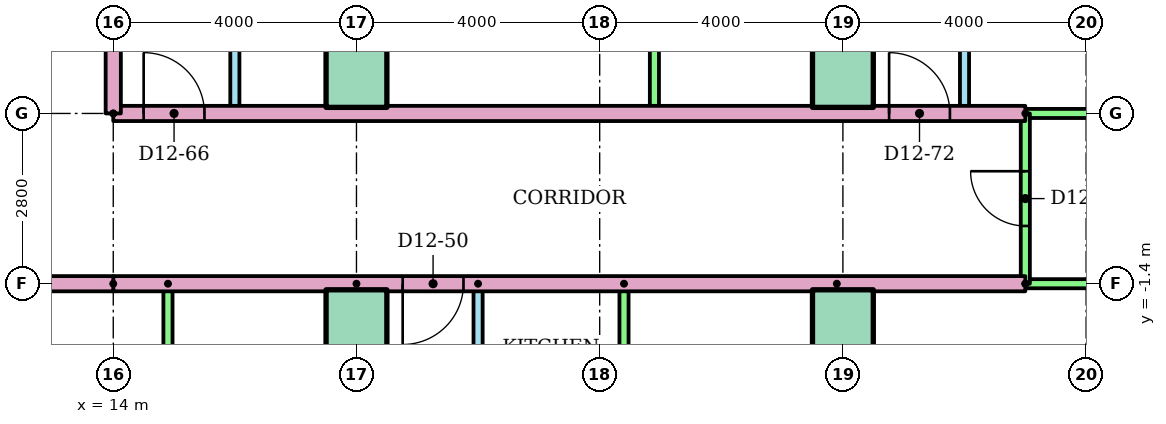
"""IFC4 building model, lengths in metres.
Left out: names, types, materials, properties, quantities, classifications, styles, units other than length and angle.
Written with IfcOpenShell. Run it as: python <this file> out.ifc"""

import sys

from ifc_helpers import new_model, si_unit, direction, frame, frame_2d, origin, origin_2d, place, context, subcontext, project, spatial, rectangle, extrude, element, fill, save


model = new_model("IFC4")
c1 = context("Model", 3, precision=1e-05, world=origin(), true_north=direction((0.0, 1.0)))
c2 = subcontext(c1, "Body", "Model", "MODEL_VIEW")
j1 = project(units=[si_unit("LENGTHUNIT", "METRE"), si_unit("PLANEANGLEUNIT", "RADIAN")], contexts=[c1])
p1 = place(None, origin())
s1 = spatial("IfcSite", under=j1, at=p1, CompositionType="ELEMENT")
p2 = place(p1, origin())
s2 = spatial("IfcBuilding", under=s1, at=p2, CompositionType="ELEMENT")
p3 = place(p2, frame((0.0, 0.0, 48.0)))
s3 = spatial("IfcBuildingStorey", under=s2, at=p3, CompositionType="ELEMENT", Elevation=48.0)
for number, where in (
    (1, (18.0, -2.0, 0.0)),
    (2, (26.0, -2.0, 0.0)),
    (3, (18.0, 2.0, 0.0)),
    (4, (26.0, 2.0, 0.0)),
):
    element("IfcColumn", number, at=place(p3, frame(where)), inside=s3, PredefinedType="COLUMN", context=c2, shape_type="SweptSolid", body=[
        extrude(rectangle(XDim=1.0, YDim=1.0, at=origin_2d()), origin(), (0.0, 0.0, 1.0), 3.2),
    ])
p4 = place(p3, frame((14.9, -1.4, 0.0), z_axis=(0.0, 0.0, 1.0), x_axis=(0.0, -1.0, 0.0)))
e5 = element("IfcWall", 5, at=p4, inside=s3, PredefinedType="PARTITIONING", context=c2, shape_type="SweptSolid", body=[
    extrude(rectangle(XDim=6.4, YDim=0.15, at=frame_2d((3.2, 0.0))), origin(), (0.0, 0.0, 1.0), 2.4),
])
p5 = place(p3, frame((20.0, -1.4, 0.0), z_axis=(0.0, 0.0, 1.0), x_axis=(0.0, -1.0, 0.0)))
e6 = element("IfcWall", 6, at=p5, inside=s3, PredefinedType="PARTITIONING", context=c2, shape_type="SweptSolid", body=[
    extrude(rectangle(XDim=6.4, YDim=0.15, at=frame_2d((3.2, 0.0))), origin(), (0.0, 0.0, 1.0), 2.4),
])
p6 = place(p5, frame((1.36, 0.0, 0.0)))
e7 = element("IfcOpeningElement", 7, at=p6, cuts=e6, PredefinedType="OPENING", context=c2, shape_type="SweptSolid", body=[
    extrude(rectangle(XDim=0.9, YDim=2.1, at=frame_2d((0.45, 1.05))), frame((0.0, 0.085, 0.0), z_axis=(0.0, -1.0, 0.0), x_axis=(1.0, 0.0, 0.0)), (0.0, 0.0, 1.0), 0.17),
])
p7 = place(p5, frame((4.55, 0.0, 0.0)))
e8 = element("IfcOpeningElement", 8, at=p7, cuts=e6, PredefinedType="OPENING", context=c2, shape_type="SweptSolid", body=[
    extrude(rectangle(XDim=0.8, YDim=2.1, at=frame_2d((0.4, 1.05))), frame((0.0, 0.085, 0.0), z_axis=(0.0, -1.0, 0.0), x_axis=(1.0, 0.0, 0.0)), (0.0, 0.0, 1.0), 0.17),
])
for number, where, z_axis, x_axis in (
    (9, (22.4, -1.4, 0.0), (0.0, 0.0, 1.0), (0.0, -1.0, 0.0)),
    (10, (25.9, -1.4, 0.0), (0.0, 0.0, 1.0), (0.0, -1.0, 0.0)),
):
    element("IfcWall", number, at=place(p3, frame(where, z_axis=z_axis, x_axis=x_axis)), inside=s3, PredefinedType="PARTITIONING", context=c2, shape_type="SweptSolid", body=[
        extrude(rectangle(XDim=6.4, YDim=0.15, at=frame_2d((3.2, 0.0))), origin(), (0.0, 0.0, 1.0), 2.4),
    ])
p8 = place(p3, frame((18.0, -1.4, 0.0), z_axis=(0.0, 0.0, 1.0), x_axis=(0.0, -1.0, 0.0)))
e11 = element("IfcWall", 11, at=p8, inside=s3, PredefinedType="PARTITIONING", context=c2, shape_type="SweptSolid", body=[
    extrude(rectangle(XDim=14.71, YDim=0.25, at=frame_2d((7.355, 0.0))), origin(), (0.0, 0.0, 1.0), 2.4),
])
p9 = place(p3, frame((29.0, -1.4, 0.0), z_axis=(0.0, 0.0, 1.0), x_axis=(-1.0, 0.0, 0.0)))
e12 = element("IfcWall", 12, at=p9, inside=s3, PredefinedType="PARTITIONING", context=c2, shape_type="SweptSolid", body=[
    extrude(rectangle(XDim=15.0, YDim=0.25, at=frame_2d((7.5, 0.0))), origin(), (0.0, 0.0, 1.0), 2.4),
])
p10 = place(p9, frame((9.24, 0.0, 0.0)))
e13 = element("IfcOpeningElement", 13, at=p10, cuts=e12, PredefinedType="OPENING", context=c2, shape_type="SweptSolid", body=[
    extrude(rectangle(XDim=1.0, YDim=2.1, at=frame_2d((0.5, 1.05))), frame((0.0, 0.135, 0.0), z_axis=(0.0, -1.0, 0.0), x_axis=(1.0, 0.0, 0.0)), (0.0, 0.0, 1.0), 0.27),
])
p11 = place(p3, frame((36.52, -1.4, 0.0), z_axis=(0.0, 0.0, 1.0), x_axis=(-1.0, 0.0, 0.0)))
e14 = element("IfcWall", 14, at=p11, inside=s3, PredefinedType="PARTITIONING", context=c2, shape_type="SweptSolid", body=[
    extrude(rectangle(XDim=7.52, YDim=0.15, at=frame_2d((3.76, 0.0))), origin(), (0.0, 0.0, 1.0), 2.4),
])
p12 = place(p3, frame((16.0, 10.2, 0.0), z_axis=(0.0, 0.0, 1.0), x_axis=(0.0, -1.0, 0.0)))
e15 = element("IfcWall", 15, at=p12, inside=s3, PredefinedType="PARTITIONING", context=c2, shape_type="SweptSolid", body=[
    extrude(rectangle(XDim=8.8, YDim=0.15, at=frame_2d((4.4, 0.0))), origin(), (0.0, 0.0, 1.0), 2.4),
])
p13 = place(p12, frame((5.975, 0.0, 0.0)))
e16 = element("IfcOpeningElement", 16, at=p13, cuts=e15, PredefinedType="OPENING", context=c2, shape_type="SweptSolid", body=[
    extrude(rectangle(XDim=0.9, YDim=2.1, at=frame_2d((0.45, 1.05))), frame((0.0, 0.085, 0.0), z_axis=(0.0, -1.0, 0.0), x_axis=(1.0, 0.0, 0.0)), (0.0, 0.0, 1.0), 0.17),
])
p14 = place(p12, frame((1.625, 0.0, 0.0)))
e17 = element("IfcOpeningElement", 17, at=p14, cuts=e15, PredefinedType="OPENING", context=c2, shape_type="SweptSolid", body=[
    extrude(rectangle(XDim=0.8, YDim=2.1, at=frame_2d((0.4, 1.05))), frame((0.0, 0.085, 0.0), z_axis=(0.0, -1.0, 0.0), x_axis=(1.0, 0.0, 0.0)), (0.0, 0.0, 1.0), 0.17),
])
for number, where, z_axis, x_axis in (
    (18, (18.4, 10.2, 0.0), (0.0, 0.0, 1.0), (0.0, -1.0, 0.0)),
    (19, (22.9, 10.2, 0.0), (0.0, 0.0, 1.0), (0.0, -1.0, 0.0)),
):
    element("IfcWall", number, at=place(p3, frame(where, z_axis=z_axis, x_axis=x_axis)), inside=s3, PredefinedType="PARTITIONING", context=c2, shape_type="SweptSolid", body=[
        extrude(rectangle(XDim=8.8, YDim=0.15, at=frame_2d((4.4, 0.0))), origin(), (0.0, 0.0, 1.0), 2.4),
    ])
p15 = place(p3, frame((28.0, 10.2, 0.0), z_axis=(0.0, 0.0, 1.0), x_axis=(0.0, -1.0, 0.0)))
e20 = element("IfcWall", 20, at=p15, inside=s3, PredefinedType="PARTITIONING", context=c2, shape_type="SweptSolid", body=[
    extrude(rectangle(XDim=8.8, YDim=0.15, at=frame_2d((4.4, 0.0))), origin(), (0.0, 0.0, 1.0), 2.4),
])
p16 = place(p15, frame((5.975, 0.0, 0.0)))
e21 = element("IfcOpeningElement", 21, at=p16, cuts=e20, PredefinedType="OPENING", context=c2, shape_type="SweptSolid", body=[
    extrude(rectangle(XDim=0.9, YDim=2.1, at=frame_2d((0.45, 1.05))), frame((0.0, 0.085, 0.0), z_axis=(0.0, -1.0, 0.0), x_axis=(1.0, 0.0, 0.0)), (0.0, 0.0, 1.0), 0.17),
])
p17 = place(p15, frame((1.625, 0.0, 0.0)))
e22 = element("IfcOpeningElement", 22, at=p17, cuts=e20, PredefinedType="OPENING", context=c2, shape_type="SweptSolid", body=[
    extrude(rectangle(XDim=0.8, YDim=2.1, at=frame_2d((0.4, 1.05))), frame((0.0, 0.085, 0.0), z_axis=(0.0, -1.0, 0.0), x_axis=(1.0, 0.0, 0.0)), (0.0, 0.0, 1.0), 0.17),
])
p18 = place(p3, frame((26.0, 18.521, 0.0), z_axis=(0.0, 0.0, 1.0), x_axis=(0.0, -1.0, 0.0)))
e23 = element("IfcWall", 23, at=p18, inside=s3, PredefinedType="PARTITIONING", context=c2, shape_type="SweptSolid", body=[
    extrude(rectangle(XDim=17.121, YDim=0.25, at=frame_2d((8.561, 0.0))), origin(), (0.0, 0.0, 1.0), 2.4),
])
p19 = place(p3, frame((14.0, 1.4, 0.0)))
e24 = element("IfcWall", 24, at=p19, inside=s3, PredefinedType="PARTITIONING", context=c2, shape_type="SweptSolid", body=[
    extrude(rectangle(XDim=15.0, YDim=0.25, at=frame_2d((7.5, 0.0))), origin(), (0.0, 0.0, 1.0), 2.4),
])
p20 = place(p19, frame((0.5, 0.0, 0.0)))
e25 = element("IfcOpeningElement", 25, at=p20, cuts=e24, PredefinedType="OPENING", context=c2, shape_type="SweptSolid", body=[
    extrude(rectangle(XDim=1.0, YDim=2.1, at=frame_2d((0.5, 1.05))), frame((0.0, 0.135, 0.0), z_axis=(0.0, -1.0, 0.0), x_axis=(1.0, 0.0, 0.0)), (0.0, 0.0, 1.0), 0.27),
])
p21 = place(p19, frame((12.76, 0.0, 0.0)))
e26 = element("IfcOpeningElement", 26, at=p21, cuts=e24, PredefinedType="OPENING", context=c2, shape_type="SweptSolid", body=[
    extrude(rectangle(XDim=1.0, YDim=2.1, at=frame_2d((0.5, 1.05))), frame((0.0, 0.135, 0.0), z_axis=(0.0, -1.0, 0.0), x_axis=(1.0, 0.0, 0.0)), (0.0, 0.0, 1.0), 0.27),
])
p22 = place(p3, frame((29.0, 1.4, 0.0)))
e27 = element("IfcWall", 27, at=p22, inside=s3, PredefinedType="PARTITIONING", context=c2, shape_type="SweptSolid", body=[
    extrude(rectangle(XDim=7.52, YDim=0.15, at=frame_2d((3.76, 0.0))), origin(), (0.0, 0.0, 1.0), 2.4),
])
p23 = place(p3, frame((29.0, -1.4, 0.0), z_axis=(0.0, 0.0, 1.0), x_axis=(0.0, 1.0, 0.0)))
e28 = element("IfcWall", 28, at=p23, inside=s3, PredefinedType="PARTITIONING", context=c2, shape_type="SweptSolid", body=[
    extrude(rectangle(XDim=2.8, YDim=0.15, at=frame_2d((1.4, 0.0))), origin(), (0.0, 0.0, 1.0), 2.4),
])
p24 = place(p23, frame((0.95, 0.0, 0.0)))
e29 = element("IfcOpeningElement", 29, at=p24, cuts=e28, PredefinedType="OPENING", context=c2, shape_type="SweptSolid", body=[
    extrude(rectangle(XDim=0.9, YDim=2.1, at=frame_2d((0.45, 1.05))), frame((0.0, 0.085, 0.0), z_axis=(0.0, -1.0, 0.0), x_axis=(1.0, 0.0, 0.0)), (0.0, 0.0, 1.0), 0.17),
])
p25 = place(p3, frame((14.0, -1.4, 0.0), z_axis=(0.0, 0.0, 1.0), x_axis=(-1.0, 0.0, 0.0)))
e30 = element("IfcWall", 30, at=p25, inside=s3, PredefinedType="PARTITIONING", context=c2, shape_type="SweptSolid", body=[
    extrude(rectangle(XDim=28.0, YDim=0.25, at=frame_2d((14.0, 0.0))), origin(), (0.0, 0.0, 1.0), 2.4),
])
p26 = place(p25, frame((12.76, 0.0, 0.0)))
e31 = element("IfcOpeningElement", 31, at=p26, cuts=e30, PredefinedType="OPENING", context=c2, shape_type="SweptSolid", body=[
    extrude(rectangle(XDim=1.0, YDim=2.1, at=frame_2d((0.5, 1.05))), frame((0.0, 0.135, 0.0), z_axis=(0.0, -1.0, 0.0), x_axis=(1.0, 0.0, 0.0)), (0.0, 0.0, 1.0), 0.27),
])
p27 = place(p25, frame((10.24, 0.0, 0.0)))
e32 = element("IfcOpeningElement", 32, at=p27, cuts=e30, PredefinedType="OPENING", context=c2, shape_type="SweptSolid", body=[
    extrude(rectangle(XDim=1.0, YDim=2.1, at=frame_2d((0.5, 1.05))), frame((0.0, 0.135, 0.0), z_axis=(0.0, -1.0, 0.0), x_axis=(1.0, 0.0, 0.0)), (0.0, 0.0, 1.0), 0.27),
])
p28 = place(p3, frame((14.0, 1.4, 0.0), z_axis=(0.0, 0.0, 1.0), x_axis=(0.0, 1.0, 0.0)))
e33 = element("IfcWall", 33, at=p28, inside=s3, PredefinedType="PARTITIONING", context=c2, shape_type="SweptSolid", body=[
    extrude(rectangle(XDim=1.6, YDim=0.25, at=frame_2d((0.8, 0.0))), origin(), (0.0, 0.0, 1.0), 2.4),
])
p29 = place(p10, origin())
e34 = element("IfcDoor", 34, at=p29, inside=s3, OperationType="SINGLE_SWING_RIGHT", PredefinedType="DOOR", context=c2, shape_type="SweptSolid", body=[
    extrude(rectangle(XDim=1.0, YDim=2.1, at=frame_2d((0.5, 1.05))), frame((0.0, 0.025, 0.0), z_axis=(0.0, -1.0, 0.0), x_axis=(1.0, 0.0, 0.0)), (0.0, 0.0, 1.0), 0.05),
])
fill(e13, e34)
p30 = place(p20, origin())
e35 = element("IfcDoor", 35, at=p30, inside=s3, OperationType="SINGLE_SWING_LEFT", PredefinedType="DOOR", context=c2, shape_type="SweptSolid", body=[
    extrude(rectangle(XDim=1.0, YDim=2.1, at=frame_2d((0.5, 1.05))), frame((0.0, 0.025, 0.0), z_axis=(0.0, -1.0, 0.0), x_axis=(1.0, 0.0, 0.0)), (0.0, 0.0, 1.0), 0.05),
])
fill(e25, e35)
p31 = place(p21, origin())
e36 = element("IfcDoor", 36, at=p31, inside=s3, OperationType="SINGLE_SWING_LEFT", PredefinedType="DOOR", context=c2, shape_type="SweptSolid", body=[
    extrude(rectangle(XDim=1.0, YDim=2.1, at=frame_2d((0.5, 1.05))), frame((0.0, 0.025, 0.0), z_axis=(0.0, -1.0, 0.0), x_axis=(1.0, 0.0, 0.0)), (0.0, 0.0, 1.0), 0.05),
])
fill(e26, e36)
p32 = place(p24, origin())
e37 = element("IfcDoor", 37, at=p32, inside=s3, OperationType="SINGLE_SWING_RIGHT", PredefinedType="DOOR", context=c2, shape_type="SweptSolid", body=[
    extrude(rectangle(XDim=0.9, YDim=2.1, at=frame_2d((0.45, 1.05))), frame((0.0, 0.025, 0.0), z_axis=(0.0, -1.0, 0.0), x_axis=(1.0, 0.0, 0.0)), (0.0, 0.0, 1.0), 0.05),
])
fill(e29, e37)
save(model, sys.argv[1])
